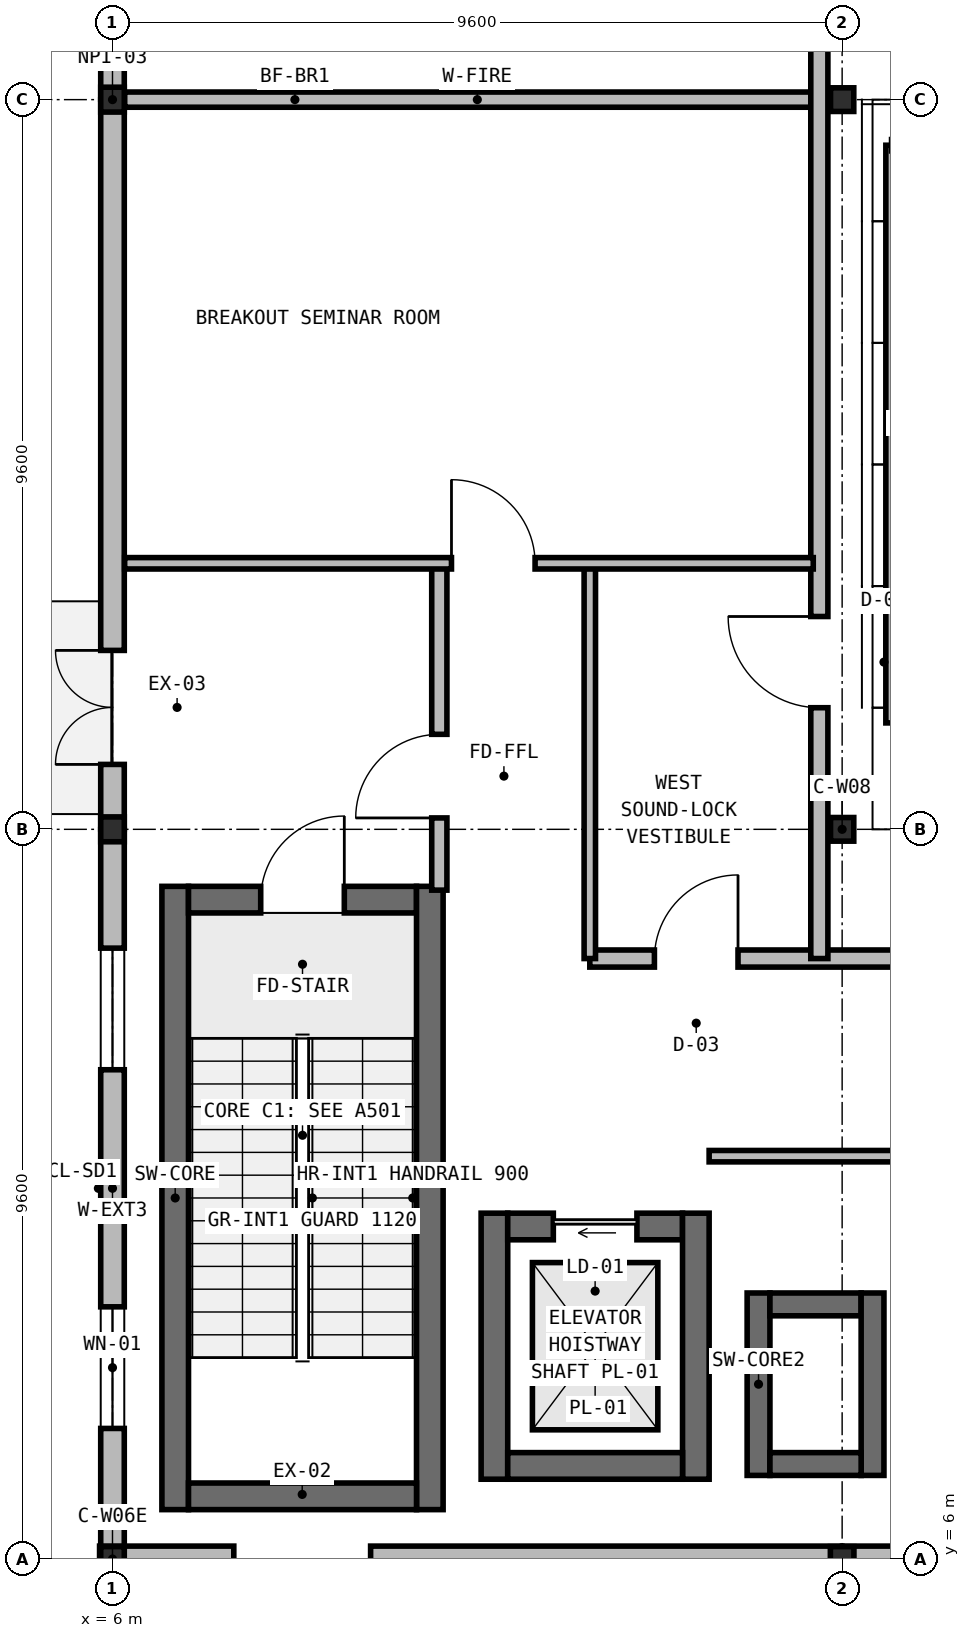
"""IFC4 building model, lengths in metres.
Left out: names, types, materials, properties, quantities, classifications, styles, units other than length and angle.
Written with IfcOpenShell. Run it as: python <this file> out.ifc"""

import sys

from ifc_helpers import new_model, si_unit, direction, frame, frame_2d, origin, origin_2d, place, context, subcontext, project, spatial, rectangle, i_section, extrude, element, fill, save


model = new_model("IFC4")
c1 = context("Model", 3, precision=1e-05, world=origin(), true_north=direction((0.0, 1.0)))
c2 = subcontext(c1, "Body", "Model", "MODEL_VIEW")
j1 = project(units=[si_unit("LENGTHUNIT", "METRE"), si_unit("PLANEANGLEUNIT", "RADIAN")], contexts=[c1])
p1 = place(None, origin())
s1 = spatial("IfcSite", under=j1, at=p1, CompositionType="ELEMENT")
p2 = place(p1, origin())
s2 = spatial("IfcBuilding", under=s1, at=p2, CompositionType="ELEMENT")
p3 = place(p2, origin())
s3 = spatial("IfcBuildingStorey", under=s2, at=p3, CompositionType="ELEMENT", Elevation=0.0)
p4 = place(p3, frame((6.825, 6.65, 0.0), z_axis=(0.0, 0.0, 1.0), x_axis=(0.0, 1.0, 0.0)))
e1 = element("IfcWall", 1, at=p4, inside=s3, PredefinedType="SHEAR", context=c2, shape_type="SweptSolid", body=[
    extrude(rectangle(XDim=8.2, YDim=0.35, at=frame_2d((4.1, 0.0))), origin(), (0.0, 0.0, 1.0), 5.25),
])
p5 = place(p3, frame((7.0, 14.675, 0.0), z_axis=(0.0, 0.0, 1.0), x_axis=(1.0, 0.0, 0.0)))
e2 = element("IfcWall", 2, at=p5, inside=s3, PredefinedType="SHEAR", context=c2, shape_type="SweptSolid", body=[
    extrude(rectangle(XDim=3.0, YDim=0.35, at=frame_2d((1.5, 0.0))), origin(), (0.0, 0.0, 1.0), 5.25),
])
p6 = place(p5, frame((0.95, 0.0, 0.0)))
e3 = element("IfcOpeningElement", 3, at=p6, cuts=e2, PredefinedType="OPENING", context=c2, shape_type="SweptSolid", body=[
    extrude(rectangle(XDim=1.1, YDim=2.15, at=frame_2d((0.55, 1.075))), frame((0.0, 0.185, 0.0), z_axis=(0.0, -1.0, 0.0), x_axis=(1.0, 0.0, 0.0)), (0.0, 0.0, 1.0), 0.37),
])
p7 = place(p3, frame((10.175, 14.85, 0.0), z_axis=(0.0, 0.0, 1.0), x_axis=(0.0, -1.0, 0.0)))
e4 = element("IfcWall", 4, at=p7, inside=s3, PredefinedType="SHEAR", context=c2, shape_type="SweptSolid", body=[
    extrude(rectangle(XDim=8.2, YDim=0.35, at=frame_2d((4.1, 0.0))), origin(), (0.0, 0.0, 1.0), 5.25),
])
p8 = place(p3, frame((10.0, 6.825, 0.0), z_axis=(0.0, 0.0, 1.0), x_axis=(-1.0, 0.0, 0.0)))
e5 = element("IfcWall", 5, at=p8, inside=s3, PredefinedType="SHEAR", context=c2, shape_type="SweptSolid", body=[
    extrude(rectangle(XDim=3.0, YDim=0.35, at=frame_2d((1.5, 0.0))), origin(), (0.0, 0.0, 1.0), 5.25),
])
p9 = place(p3, frame((11.025, 7.05, 0.0), z_axis=(0.0, 0.0, 1.0), x_axis=(0.0, 1.0, 0.0)))
e6 = element("IfcWall", 6, at=p9, inside=s3, PredefinedType="SHEAR", context=c2, shape_type="SweptSolid", body=[
    extrude(rectangle(XDim=3.5, YDim=0.35, at=frame_2d((1.75, 0.0))), origin(), (0.0, 0.0, 1.0), 5.25),
])
p10 = place(p3, frame((11.2, 10.375, 0.0), z_axis=(0.0, 0.0, 1.0), x_axis=(1.0, 0.0, 0.0)))
e7 = element("IfcWall", 7, at=p10, inside=s3, PredefinedType="SHEAR", context=c2, shape_type="SweptSolid", body=[
    extrude(rectangle(XDim=2.3, YDim=0.35, at=frame_2d((1.15, 0.0))), origin(), (0.0, 0.0, 1.0), 5.25),
])
p11 = place(p10, frame((0.6, 0.0, 0.0)))
e8 = element("IfcOpeningElement", 8, at=p11, cuts=e7, PredefinedType="OPENING", context=c2, shape_type="SweptSolid", body=[
    extrude(rectangle(XDim=1.1, YDim=2.15, at=frame_2d((0.55, 1.075))), frame((0.0, 0.185, 0.0), z_axis=(0.0, -1.0, 0.0), x_axis=(1.0, 0.0, 0.0)), (0.0, 0.0, 1.0), 0.37),
])
p12 = place(p3, frame((13.675, 10.55, 0.0), z_axis=(0.0, 0.0, 1.0), x_axis=(0.0, -1.0, 0.0)))
e9 = element("IfcWall", 9, at=p12, inside=s3, PredefinedType="SHEAR", context=c2, shape_type="SweptSolid", body=[
    extrude(rectangle(XDim=3.5, YDim=0.35, at=frame_2d((1.75, 0.0))), origin(), (0.0, 0.0, 1.0), 5.25),
])
p13 = place(p3, frame((13.5, 7.225, 0.0), z_axis=(0.0, 0.0, 1.0), x_axis=(-1.0, 0.0, 0.0)))
e10 = element("IfcWall", 10, at=p13, inside=s3, PredefinedType="SHEAR", context=c2, shape_type="SweptSolid", body=[
    extrude(rectangle(XDim=2.3, YDim=0.35, at=frame_2d((1.15, 0.0))), origin(), (0.0, 0.0, 1.0), 5.25),
])
for number, where, z_axis, x_axis in (
    (11, (6.0, 6.0, 0.0), (0.0, 0.0, 1.0), (1.0, 0.0, 0.0)),
    (12, (6.0, 15.6, 0.0), (0.0, 0.0, 1.0), (1.0, 0.0, 0.0)),
    (13, (6.0, 25.2, 0.0), (0.0, 0.0, 1.0), (1.0, 0.0, 0.0)),
    (14, (15.6, 6.0, 0.0), (0.0, 0.0, 1.0), (1.0, 0.0, 0.0)),
):
    element("IfcColumn", number, at=place(p3, frame(where, z_axis=z_axis, x_axis=x_axis)), inside=s3, PredefinedType="COLUMN", context=c2, shape_type="SweptSolid", body=[
        extrude(i_section(OverallWidth=0.31, OverallDepth=0.327, WebThickness=0.016, FlangeThickness=0.025, at=origin_2d()), origin(), (0.0, 0.0, 1.0), 5.25),
    ])
for number, where, z_axis, x_axis in (
    (15, (15.6, 15.6, 0.0), (0.0, 0.0, 1.0), (1.0, 0.0, 0.0)),
    (16, (15.6, 25.2, 0.0), (0.0, 0.0, 1.0), (1.0, 0.0, 0.0)),
):
    element("IfcColumn", number, at=place(p3, frame(where, z_axis=z_axis, x_axis=x_axis)), inside=s3, PredefinedType="COLUMN", context=c2, shape_type="SweptSolid", body=[
        extrude(i_section(OverallWidth=0.306, OverallDepth=0.311, WebThickness=0.011, FlangeThickness=0.017, at=origin_2d()), origin(), (0.0, 0.0, 1.0), 5.25),
    ])
p14 = place(p3, frame((14.5, 7.1, 0.0), z_axis=(0.0, 0.0, 1.0), x_axis=(0.0, 1.0, 0.0)))
e17 = element("IfcWall", 17, at=p14, inside=s3, PredefinedType="SHEAR", context=c2, shape_type="SweptSolid", body=[
    extrude(rectangle(XDim=2.4, YDim=0.3, at=frame_2d((1.2, 0.0))), origin(), (0.0, 0.0, 1.0), 5.07),
])
p15 = place(p3, frame((14.65, 9.35, 0.0), z_axis=(0.0, 0.0, 1.0), x_axis=(1.0, 0.0, 0.0)))
e18 = element("IfcWall", 18, at=p15, inside=s3, PredefinedType="SHEAR", context=c2, shape_type="SweptSolid", body=[
    extrude(rectangle(XDim=1.2, YDim=0.3, at=frame_2d((0.6, 0.0))), origin(), (0.0, 0.0, 1.0), 5.07),
])
p16 = place(p3, frame((16.0, 9.5, 0.0), z_axis=(0.0, 0.0, 1.0), x_axis=(0.0, -1.0, 0.0)))
e19 = element("IfcWall", 19, at=p16, inside=s3, PredefinedType="SHEAR", context=c2, shape_type="SweptSolid", body=[
    extrude(rectangle(XDim=2.4, YDim=0.3, at=frame_2d((1.2, 0.0))), origin(), (0.0, 0.0, 1.0), 5.07),
])
p17 = place(p3, frame((15.85, 7.25, 0.0), z_axis=(0.0, 0.0, 1.0), x_axis=(-1.0, 0.0, 0.0)))
e20 = element("IfcWall", 20, at=p17, inside=s3, PredefinedType="SHEAR", context=c2, shape_type="SweptSolid", body=[
    extrude(rectangle(XDim=1.2, YDim=0.3, at=frame_2d((0.6, 0.0))), origin(), (0.0, 0.0, 1.0), 5.07),
])
p18 = place(p3, frame((6.0, 6.159, 0.0), z_axis=(0.0, 0.0, 1.0), x_axis=(0.0, 1.0, 0.0)))
e21 = element("IfcWall", 21, at=p18, inside=s3, PredefinedType="SOLIDWALL", context=c2, shape_type="SweptSolid", body=[
    extrude(rectangle(XDim=9.437, YDim=0.31, at=frame_2d((4.719, 0.0))), origin(), (0.0, 0.0, 1.0), 4.584),
])
p19 = place(p18, frame((1.559, 0.0, 0.95)))
e22 = element("IfcOpeningElement", 22, at=p19, cuts=e21, PredefinedType="OPENING", context=c2, shape_type="SweptSolid", body=[
    extrude(rectangle(XDim=1.6, YDim=2.02, at=frame_2d((0.8, 1.01))), frame((0.0, 0.165, 0.0), z_axis=(0.0, -1.0, 0.0), x_axis=(1.0, 0.0, 0.0)), (0.0, 0.0, 1.0), 0.33),
])
p20 = place(p18, frame((6.278, 0.0, 0.95)))
e23 = element("IfcOpeningElement", 23, at=p20, cuts=e21, PredefinedType="OPENING", context=c2, shape_type="SweptSolid", body=[
    extrude(rectangle(XDim=1.6, YDim=2.02, at=frame_2d((0.8, 1.01))), frame((0.0, 0.165, 0.0), z_axis=(0.0, -1.0, 0.0), x_axis=(1.0, 0.0, 0.0)), (0.0, 0.0, 1.0), 0.33),
])
p21 = place(p3, frame((6.0, 15.604, 0.0), z_axis=(0.0, 0.0, 1.0), x_axis=(0.0, 1.0, 0.0)))
e24 = element("IfcWall", 24, at=p21, inside=s3, PredefinedType="SOLIDWALL", context=c2, shape_type="SweptSolid", body=[
    extrude(rectangle(XDim=9.592, YDim=0.31, at=frame_2d((4.796, 0.0))), origin(), (0.0, 0.0, 1.0), 4.584),
])
p22 = place(p21, frame((0.85, 0.0, 0.0)))
e25 = element("IfcOpeningElement", 25, at=p22, cuts=e24, PredefinedType="OPENING", context=c2, shape_type="SweptSolid", body=[
    extrude(rectangle(XDim=1.5, YDim=2.2, at=frame_2d((0.75, 1.1))), frame((0.0, 0.165, 0.0), z_axis=(0.0, -1.0, 0.0), x_axis=(1.0, 0.0, 0.0)), (0.0, 0.0, 1.0), 0.33),
])
p23 = place(p3, frame((6.0, 25.204, 0.0), z_axis=(0.0, 0.0, 1.0), x_axis=(0.0, 1.0, 0.0)))
e26 = element("IfcWall", 26, at=p23, inside=s3, PredefinedType="SOLIDWALL", context=c2, shape_type="SweptSolid", body=[
    extrude(rectangle(XDim=9.437, YDim=0.31, at=frame_2d((4.719, 0.0))), origin(), (0.0, 0.0, 1.0), 4.584),
])
p24 = place(p23, frame((1.229, 0.0, 0.95)))
e27 = element("IfcOpeningElement", 27, at=p24, cuts=e26, PredefinedType="OPENING", context=c2, shape_type="SweptSolid", body=[
    extrude(rectangle(XDim=2.26, YDim=1.86, at=frame_2d((1.13, 0.93))), frame((0.0, 0.165, 0.0), z_axis=(0.0, -1.0, 0.0), x_axis=(1.0, 0.0, 0.0)), (0.0, 0.0, 1.0), 0.33),
])
p25 = place(p23, frame((5.948, 0.0, 0.95)))
e28 = element("IfcOpeningElement", 28, at=p25, cuts=e26, PredefinedType="OPENING", context=c2, shape_type="SweptSolid", body=[
    extrude(rectangle(XDim=2.26, YDim=1.86, at=frame_2d((1.13, 0.93))), frame((0.0, 0.165, 0.0), z_axis=(0.0, -1.0, 0.0), x_axis=(1.0, 0.0, 0.0)), (0.0, 0.0, 1.0), 0.33),
])
p26 = place(p3, frame((15.596, 6.0, 0.0), z_axis=(0.0, 0.0, 1.0), x_axis=(-1.0, 0.0, 0.0)))
e29 = element("IfcWall", 29, at=p26, inside=s3, PredefinedType="SOLIDWALL", context=c2, shape_type="SweptSolid", body=[
    extrude(rectangle(XDim=9.766, YDim=0.34, at=frame_2d((4.883, 0.0))), origin(), (0.0, 0.0, 1.0), 4.584),
])
p27 = place(p26, frame((6.2, 0.0, 0.0)))
e30 = element("IfcOpeningElement", 30, at=p27, cuts=e29, PredefinedType="OPENING", context=c2, shape_type="SweptSolid", body=[
    extrude(rectangle(XDim=1.8, YDim=2.25, at=frame_2d((0.9, 1.125))), frame((0.0, 0.18, 0.0), z_axis=(0.0, -1.0, 0.0), x_axis=(1.0, 0.0, 0.0)), (0.0, 0.0, 1.0), 0.36),
])
p28 = place(p3, frame((25.196, 6.0, 0.0), z_axis=(0.0, 0.0, 1.0), x_axis=(-1.0, 0.0, 0.0)))
e31 = element("IfcWall", 31, at=p28, inside=s3, PredefinedType="SOLIDWALL", context=c2, shape_type="SweptSolid", body=[
    extrude(rectangle(XDim=9.592, YDim=0.34, at=frame_2d((4.796, 0.0))), origin(), (0.0, 0.0, 1.0), 4.584),
])
p29 = place(p28, frame((3.4, 0.0, 0.0)))
e32 = element("IfcOpeningElement", 32, at=p29, cuts=e31, PredefinedType="OPENING", context=c2, shape_type="SweptSolid", body=[
    extrude(rectangle(XDim=2.0, YDim=2.3, at=frame_2d((1.0, 1.15))), frame((0.0, 0.18, 0.0), z_axis=(0.0, -1.0, 0.0), x_axis=(1.0, 0.0, 0.0)), (0.0, 0.0, 1.0), 0.36),
])
p30 = place(p3, frame((6.16, 25.2, 0.0), z_axis=(0.0, 0.0, 1.0), x_axis=(1.0, 0.0, 0.0)))
e33 = element("IfcWall", 33, at=p30, inside=s3, PredefinedType="SOLIDWALL", context=c2, shape_type="SweptSolid", body=[
    extrude(rectangle(XDim=9.28, YDim=0.2, at=frame_2d((4.64, 0.0))), origin(), (0.0, 0.0, 1.0), 4.517),
])
p31 = place(p3, frame((10.3, 14.8, 0.0), z_axis=(0.0, 0.0, 1.0), x_axis=(0.0, 1.0, 0.0)))
e34 = element("IfcWall", 34, at=p31, inside=s3, PredefinedType="SOLIDWALL", context=c2, shape_type="SweptSolid", body=[
    extrude(rectangle(XDim=4.3, YDim=0.2, at=frame_2d((2.15, 0.0))), origin(), (0.0, 0.0, 1.0), 4.93),
])
p32 = place(p31, frame((0.95, 0.0, 0.0)))
e35 = element("IfcOpeningElement", 35, at=p32, cuts=e34, PredefinedType="OPENING", context=c2, shape_type="SweptSolid", body=[
    extrude(rectangle(XDim=1.1, YDim=2.15, at=frame_2d((0.55, 1.075))), frame((0.0, 0.11, 0.0), z_axis=(0.0, -1.0, 0.0), x_axis=(1.0, 0.0, 0.0)), (0.0, 0.0, 1.0), 0.22),
])
p33 = place(p3, frame((16.25, 17.0, 0.0), z_axis=(0.0, 0.0, 1.0), x_axis=(0.0, 1.0, 0.0)))
e36 = element("IfcWall", 36, at=p33, inside=s3, PredefinedType="PARTITIONING", context=c2, shape_type="SweptSolid", body=[
    extrude(rectangle(XDim=7.6, YDim=0.15, at=frame_2d((3.8, 0.0))), origin(), (0.0, 0.0, 1.0), 4.93),
])
p34 = place(p3, frame((13.85, 11.3, 0.0), z_axis=(0.0, 0.0, 1.0), x_axis=(1.0, 0.0, 0.0)))
e37 = element("IfcWall", 37, at=p34, inside=s3, PredefinedType="PARTITIONING", context=c2, shape_type="SweptSolid", body=[
    extrude(rectangle(XDim=13.65, YDim=0.15, at=frame_2d((6.825, 0.0))), origin(), (0.0, 0.0, 1.0), 4.93),
])
p35 = place(p34, frame((4.2, 0.0, 0.0)))
e38 = element("IfcOpeningElement", 38, at=p35, cuts=e37, PredefinedType="OPENING", context=c2, shape_type="SweptSolid", body=[
    extrude(rectangle(XDim=1.6, YDim=2.2, at=frame_2d((0.8, 1.1))), frame((0.0, 0.085, 0.0), z_axis=(0.0, -1.0, 0.0), x_axis=(1.0, 0.0, 0.0)), (0.0, 0.0, 1.0), 0.17),
])
p36 = place(p3, frame((12.28, 13.9, 0.0), z_axis=(0.0, 0.0, 1.0), x_axis=(1.0, 0.0, 0.0)))
e39 = element("IfcWall", 39, at=p36, inside=s3, PredefinedType="SOLIDWALL", context=c2, shape_type="SweptSolid", body=[
    extrude(rectangle(XDim=15.22, YDim=0.225, at=frame_2d((7.61, 0.0))), origin(), (0.0, 0.0, 1.0), 4.93),
])
p37 = place(p36, frame((0.85, 0.0, 0.0)))
e40 = element("IfcOpeningElement", 40, at=p37, cuts=e39, PredefinedType="OPENING", context=c2, shape_type="SweptSolid", body=[
    extrude(rectangle(XDim=1.1, YDim=2.2, at=frame_2d((0.55, 1.1))), frame((0.0, 0.123, 0.0), z_axis=(0.0, -1.0, 0.0), x_axis=(1.0, 0.0, 0.0)), (0.0, 0.0, 1.0), 0.245),
])
p38 = place(p36, frame((13.4, 0.0, 0.0)))
e41 = element("IfcOpeningElement", 41, at=p38, cuts=e39, PredefinedType="OPENING", context=c2, shape_type="SweptSolid", body=[
    extrude(rectangle(XDim=1.1, YDim=2.2, at=frame_2d((0.55, 1.1))), frame((0.0, 0.123, 0.0), z_axis=(0.0, -1.0, 0.0), x_axis=(1.0, 0.0, 0.0)), (0.0, 0.0, 1.0), 0.245),
])
p39 = place(p3, frame((12.28, 13.9, 0.0), z_axis=(0.0, 0.0, 1.0), x_axis=(0.0, 1.0, 0.0)))
e42 = element("IfcWall", 42, at=p39, inside=s3, PredefinedType="PARTITIONING", context=c2, shape_type="SweptSolid", body=[
    extrude(rectangle(XDim=5.2, YDim=0.15, at=frame_2d((2.6, 0.0))), origin(), (0.0, 0.0, 1.0), 4.93),
])
p40 = place(p3, frame((15.3, 13.9, 0.0), z_axis=(0.0, 0.0, 1.0), x_axis=(0.0, 1.0, 0.0)))
e43 = element("IfcWall", 43, at=p40, inside=s3, PredefinedType="SOLIDWALL", context=c2, shape_type="SweptSolid", body=[
    extrude(rectangle(XDim=20.74, YDim=0.225, at=frame_2d((10.37, 0.0))), origin(), (0.0, 0.0, 1.0), 4.93),
])
p41 = place(p40, frame((3.3, 0.0, 0.0)))
e44 = element("IfcOpeningElement", 44, at=p41, cuts=e43, PredefinedType="OPENING", context=c2, shape_type="SweptSolid", body=[
    extrude(rectangle(XDim=1.2, YDim=2.2, at=frame_2d((0.6, 1.1))), frame((0.0, 0.123, 0.0), z_axis=(0.0, -1.0, 0.0), x_axis=(1.0, 0.0, 0.0)), (0.0, 0.0, 1.0), 0.245),
])
p42 = place(p40, frame((15.6, 0.0, 0.0)))
e45 = element("IfcOpeningElement", 45, at=p42, cuts=e43, PredefinedType="OPENING", context=c2, shape_type="SweptSolid", body=[
    extrude(rectangle(XDim=1.2, YDim=2.2, at=frame_2d((0.6, 1.1))), frame((0.0, 0.123, 0.0), z_axis=(0.0, -1.0, 0.0), x_axis=(1.0, 0.0, 0.0)), (0.0, 0.0, 1.0), 0.245),
])
p43 = place(p40, frame((18.3, 0.0, 0.0)))
e46 = element("IfcOpeningElement", 46, at=p43, cuts=e43, PredefinedType="OPENING", context=c2, shape_type="SweptSolid", body=[
    extrude(rectangle(XDim=1.1, YDim=2.2, at=frame_2d((0.55, 1.1))), frame((0.0, 0.123, 0.0), z_axis=(0.0, -1.0, 0.0), x_axis=(1.0, 0.0, 0.0)), (0.0, 0.0, 1.0), 0.245),
])
p44 = place(p3, frame((6.16, 19.1, 0.0), z_axis=(0.0, 0.0, 1.0), x_axis=(1.0, 0.0, 0.0)))
e47 = element("IfcWall", 47, at=p44, inside=s3, PredefinedType="PARTITIONING", context=c2, shape_type="SweptSolid", body=[
    extrude(rectangle(XDim=9.06, YDim=0.15, at=frame_2d((4.53, 0.0))), origin(), (0.0, 0.0, 1.0), 4.93),
])
p45 = place(p44, frame((4.3, 0.0, 0.0)))
e48 = element("IfcOpeningElement", 48, at=p45, cuts=e47, PredefinedType="OPENING", context=c2, shape_type="SweptSolid", body=[
    extrude(rectangle(XDim=1.1, YDim=2.2, at=frame_2d((0.55, 1.1))), frame((0.0, 0.085, 0.0), z_axis=(0.0, -1.0, 0.0), x_axis=(1.0, 0.0, 0.0)), (0.0, 0.0, 1.0), 0.17),
])
p46 = place(p19, origin())
e49 = element("IfcWindow", 49, at=p46, inside=s3, PartitioningType="SINGLE_PANEL", PredefinedType="WINDOW", context=c2, shape_type="SweptSolid", body=[
    extrude(rectangle(XDim=1.6, YDim=2.02, at=frame_2d((0.8, 1.01))), frame((0.0, 0.03, 0.0), z_axis=(0.0, -1.0, 0.0), x_axis=(1.0, 0.0, 0.0)), (0.0, 0.0, 1.0), 0.06),
])
fill(e22, e49)
p47 = place(p20, origin())
e50 = element("IfcWindow", 50, at=p47, inside=s3, PartitioningType="SINGLE_PANEL", PredefinedType="WINDOW", context=c2, shape_type="SweptSolid", body=[
    extrude(rectangle(XDim=1.6, YDim=2.02, at=frame_2d((0.8, 1.01))), frame((0.0, 0.03, 0.0), z_axis=(0.0, -1.0, 0.0), x_axis=(1.0, 0.0, 0.0)), (0.0, 0.0, 1.0), 0.06),
])
fill(e23, e50)
p48 = place(p22, origin())
e51 = element("IfcDoor", 51, at=p48, inside=s3, OperationType="DOUBLE_DOOR_SINGLE_SWING", PredefinedType="DOOR", context=c2, shape_type="SweptSolid", body=[
    extrude(rectangle(XDim=1.5, YDim=2.2, at=frame_2d((0.75, 1.1))), frame((0.0, 0.025, 0.0), z_axis=(0.0, -1.0, 0.0), x_axis=(1.0, 0.0, 0.0)), (0.0, 0.0, 1.0), 0.05),
])
fill(e25, e51)
p49 = place(p27, origin())
e52 = element("IfcDoor", 52, at=p49, inside=s3, OperationType="DOUBLE_DOOR_SINGLE_SWING", PredefinedType="DOOR", context=c2, shape_type="SweptSolid", body=[
    extrude(rectangle(XDim=1.8, YDim=2.25, at=frame_2d((0.9, 1.125))), frame((0.0, 0.025, 0.0), z_axis=(0.0, -1.0, 0.0), x_axis=(1.0, 0.0, 0.0)), (0.0, 0.0, 1.0), 0.05),
])
fill(e30, e52)
p50 = place(p6, origin())
e53 = element("IfcDoor", 53, at=p50, inside=s3, OperationType="SINGLE_SWING_RIGHT", PredefinedType="DOOR", context=c2, shape_type="SweptSolid", body=[
    extrude(rectangle(XDim=1.1, YDim=2.15, at=frame_2d((0.55, 1.075))), frame((0.0, 0.025, 0.0), z_axis=(0.0, -1.0, 0.0), x_axis=(1.0, 0.0, 0.0)), (0.0, 0.0, 1.0), 0.05),
])
fill(e3, e53)
p51 = place(p11, origin())
e54 = element("IfcDoor", 54, at=p51, inside=s3, OperationType="SLIDING_TO_LEFT", PredefinedType="USERDEFINED", context=c2, shape_type="SweptSolid", body=[
    extrude(rectangle(XDim=1.1, YDim=2.15, at=frame_2d((0.55, 1.075))), frame((0.0, 0.025, 0.0), z_axis=(0.0, -1.0, 0.0), x_axis=(1.0, 0.0, 0.0)), (0.0, 0.0, 1.0), 0.05),
])
fill(e8, e54)
p52 = place(p32, origin())
e55 = element("IfcDoor", 55, at=p52, inside=s3, OperationType="SINGLE_SWING_LEFT", PredefinedType="DOOR", context=c2, shape_type="SweptSolid", body=[
    extrude(rectangle(XDim=1.1, YDim=2.15, at=frame_2d((0.55, 1.075))), frame((0.0, 0.025, 0.0), z_axis=(0.0, -1.0, 0.0), x_axis=(1.0, 0.0, 0.0)), (0.0, 0.0, 1.0), 0.05),
])
fill(e35, e55)
p53 = place(p37, origin())
e56 = element("IfcDoor", 56, at=p53, inside=s3, OperationType="SINGLE_SWING_RIGHT", PredefinedType="DOOR", context=c2, shape_type="SweptSolid", body=[
    extrude(rectangle(XDim=1.1, YDim=2.2, at=frame_2d((0.55, 1.1))), frame((0.0, 0.025, 0.0), z_axis=(0.0, -1.0, 0.0), x_axis=(1.0, 0.0, 0.0)), (0.0, 0.0, 1.0), 0.05),
])
fill(e40, e56)
p54 = place(p41, origin())
e57 = element("IfcDoor", 57, at=p54, inside=s3, OperationType="SINGLE_SWING_RIGHT", PredefinedType="DOOR", context=c2, shape_type="SweptSolid", body=[
    extrude(rectangle(XDim=1.2, YDim=2.2, at=frame_2d((0.6, 1.1))), frame((0.0, 0.025, 0.0), z_axis=(0.0, -1.0, 0.0), x_axis=(1.0, 0.0, 0.0)), (0.0, 0.0, 1.0), 0.05),
])
fill(e44, e57)
p55 = place(p45, origin())
e58 = element("IfcDoor", 58, at=p55, inside=s3, OperationType="SINGLE_SWING_LEFT", PredefinedType="DOOR", context=c2, shape_type="SweptSolid", body=[
    extrude(rectangle(XDim=1.1, YDim=2.2, at=frame_2d((0.55, 1.1))), frame((0.0, 0.025, 0.0), z_axis=(0.0, -1.0, 0.0), x_axis=(1.0, 0.0, 0.0)), (0.0, 0.0, 1.0), 0.05),
])
fill(e48, e58)
save(model, sys.argv[1])
